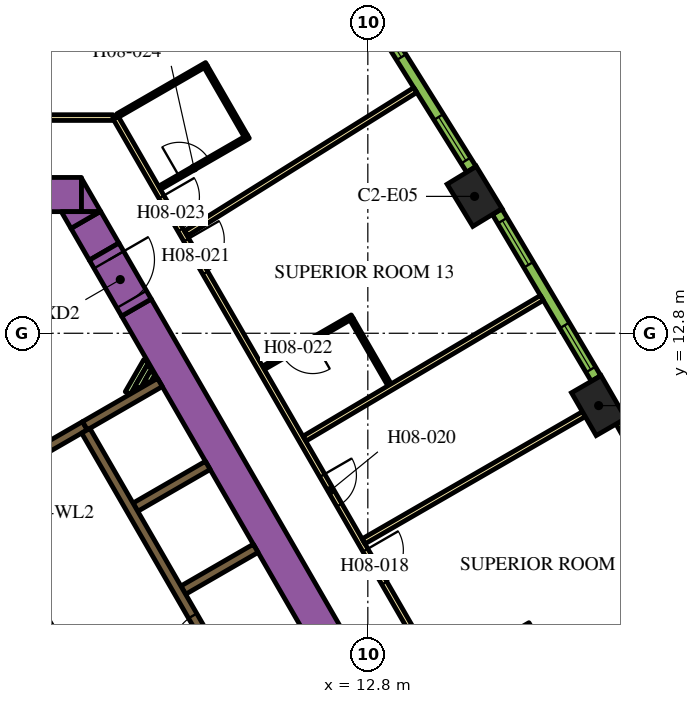
"""IFC4 building model, lengths in metres.
Left out: names, types, materials, properties, quantities, classifications, styles, units other than length and angle.
Written with IfcOpenShell. Run it as: python <this file> out.ifc"""

import sys

from ifc_helpers import new_model, si_unit, direction, frame, frame_2d, origin, origin_2d, place, context, subcontext, project, spatial, polyline, rectangle, outline, extrude, element, fill, save


model = new_model("IFC4")
c1 = context("Model", 3, precision=1e-05, world=origin(), true_north=direction((0.0, 1.0)))
c2 = subcontext(c1, "Body", "Model", "MODEL_VIEW")
j1 = project(units=[si_unit("LENGTHUNIT", "METRE"), si_unit("PLANEANGLEUNIT", "RADIAN")], contexts=[c1])
p1 = place(None, origin())
s1 = spatial("IfcSite", under=j1, at=p1, CompositionType="ELEMENT")
p2 = place(p1, origin())
s2 = spatial("IfcBuilding", under=s1, at=p2, CompositionType="ELEMENT")
p3 = place(p2, frame((0.0, 0.0, 107.1)))
s3 = spatial("IfcBuildingStorey", under=s2, at=p3, CompositionType="ELEMENT", Elevation=107.1)
for number, where, z_axis, x_axis in (
    (1, (18.874, 10.897, 0.0), (0.0, 0.0, 1.0), (-0.5, 0.866, 0.0)),
    (2, (15.609, 16.402, 0.0), (0.0, 0.0, 1.0), (-0.52, 0.854, 0.0)),
):
    element("IfcColumn", number, at=place(p3, frame(where, z_axis=z_axis, x_axis=x_axis)), inside=s3, PredefinedType="COLUMN", context=c2, shape_type="SweptSolid", body=[
        extrude(rectangle(XDim=1.3, YDim=0.9, at=origin_2d()), origin(), (0.0, 0.0, 1.0), 3.9),
    ])
p4 = place(p3, frame((6.711, 13.476, 0.0), z_axis=(0.0, 0.0, 1.0), x_axis=(0.500002723396, -0.866023831425, 0.0)))
e3 = element("IfcWall", 3, at=p4, inside=s3, PredefinedType="SOLIDWALL", context=c2, shape_type="SweptSolid", body=[
    extrude(rectangle(XDim=20.334, YDim=0.9, at=frame_2d((10.167, 0.0))), origin(), (0.0, 0.0, 1.0), 3.9),
])
p5 = place(p3, frame((-4.224, 16.45, 0.0), z_axis=(0.0, 0.0, 1.0), x_axis=(1.0, 0.0, 0.0)))
e4 = element("IfcWall", 4, at=p5, inside=s3, PredefinedType="SOLIDWALL", context=c2, shape_type="SweptSolid", body=[
    extrude(rectangle(XDim=9.488, YDim=0.9, at=frame_2d((4.744, 0.0))), origin(), (0.0, 0.0, 1.0), 3.9),
])
p6 = place(p3, origin())
e5 = element("IfcWall", 5, at=p6, inside=s3, PredefinedType="SOLIDWALL", context=c2, shape_type="SweptSolid", body=[
    extrude(outline(polyline([(5.265, 16.0), (5.265, 16.88), (5.773, 16.0), (5.265, 16.0)])), origin(), (0.0, 0.0, 1.0), 3.9),
])
p7 = place(p3, frame((5.861, 14.949, 0.0), z_axis=(0.0, 0.0, 1.0), x_axis=(-0.50011719232, 0.865957732194, 0.0)))
e6 = element("IfcWall", 6, at=p7, inside=s3, PredefinedType="SOLIDWALL", context=c2, shape_type="SweptSolid", body=[
    extrude(rectangle(XDim=0.964, YDim=0.9, at=frame_2d((0.482, 0.0))), origin(), (0.0, 0.0, 1.0), 3.9),
])
e7 = element("IfcWall", 7, at=p6, inside=s3, PredefinedType="SOLIDWALL", context=c2, shape_type="SweptSolid", body=[
    extrude(outline(polyline([(4.734, 16.0), (5.75, 16.0), (4.988, 15.56), (4.734, 16.0)])), origin(), (0.0, 0.0, 1.0), 3.9),
])
e8 = element("IfcWall", 8, at=p6, inside=s3, PredefinedType="SOLIDWALL", context=c2, shape_type="SweptSolid", body=[
    extrude(outline(polyline([(0.566, 6.725), (0.566, 6.875), (0.566, 6.875), (0.565, 6.875), (0.361, 6.875), (0.035, 7.439), (0.252, 7.564), (0.377, 7.348), (6.552, -3.348), (6.677, -3.564), (6.46, -3.689), (0.448, 6.725), (0.565, 6.725), (0.566, 6.725), (0.566, 6.725)])), origin(), (0.0, 0.0, 1.0), 3.9),
])
p8 = place(p3, frame((4.358, 9.791, 0.0), z_axis=(0.0, 0.0, 1.0), x_axis=(0.866079547155, 0.499906209203, 0.0)))
e9 = element("IfcWall", 9, at=p8, inside=s3, PredefinedType="SOLIDWALL", context=c2, shape_type="SweptSolid", body=[
    extrude(rectangle(XDim=1.15, YDim=0.25, at=frame_2d((0.575, 0.0))), origin(), (0.0, 0.0, 1.0), 3.9),
])
p9 = place(p3, frame((5.356, 10.367, 0.0), z_axis=(0.0, 0.0, 1.0), x_axis=(0.865978535641, 0.50008116922, 0.0)))
e10 = element("IfcWall", 10, at=p9, inside=s3, PredefinedType="SOLIDWALL", context=c2, shape_type="SweptSolid", body=[
    extrude(rectangle(XDim=2.278, YDim=0.25, at=frame_2d((1.139, 0.0))), origin(), (0.0, 0.0, 1.0), 3.9),
])
for number, where, z_axis, x_axis in (
    (11, (6.684, 8.224, 0.0), (0.0, 0.0, 1.0), (0.866, 0.5, 0.0)),
    (12, (7.944, 6.041, 0.0), (0.0, 0.0, 1.0), (0.866, 0.5, 0.0)),
):
    element("IfcWall", number, at=place(p3, frame(where, z_axis=z_axis, x_axis=x_axis)), inside=s3, PredefinedType="SOLIDWALL", context=c2, shape_type="SweptSolid", body=[
        extrude(rectangle(XDim=2.2, YDim=0.25, at=frame_2d((1.1, 0.0))), origin(), (0.0, 0.0, 1.0), 3.9),
    ])
p10 = place(p3, frame((6.482, 11.225, 0.0), z_axis=(0.0, 0.0, 1.0), x_axis=(0.5001061818, 0.865964091014, 0.0)))
e13 = element("IfcWall", 13, at=p10, inside=s3, PredefinedType="PARTITIONING", context=c2, shape_type="SweptSolid", body=[
    extrude(rectangle(XDim=0.973, YDim=0.15, at=frame_2d((0.486, 0.0))), origin(), (0.0, 0.0, 1.0), 2.75),
])
p11 = place(p3, frame((6.742, 11.375, 0.0), z_axis=(0.0, 0.0, 1.0), x_axis=(0.499744951064, 0.86617260629, 0.0)))
e14 = element("IfcWall", 14, at=p11, inside=s3, PredefinedType="PARTITIONING", context=c2, shape_type="SweptSolid", body=[
    extrude(rectangle(XDim=0.626, YDim=0.15, at=frame_2d((0.313, 0.0))), origin(), (0.0, 0.0, 1.0), 2.75),
])
p12 = place(p3, frame((7.001, 11.525, 0.0), z_axis=(0.0, 0.0, 1.0), x_axis=(0.499797962495, 0.866142018774, 0.0)))
e15 = element("IfcWall", 15, at=p12, inside=s3, PredefinedType="PARTITIONING", context=c2, shape_type="SweptSolid", body=[
    extrude(rectangle(XDim=0.28, YDim=0.15, at=frame_2d((0.14, 0.0))), origin(), (0.0, 0.0, 1.0), 2.75),
])
p13 = place(p3, frame((11.553, -0.46, 0.0), z_axis=(0.0, 0.0, 1.0), x_axis=(-0.500006514828, 0.866021642414, 0.0)))
e16 = element("IfcWall", 16, at=p13, inside=s3, PredefinedType="SOLIDWALL", context=c2, shape_type="SweptSolid", body=[
    extrude(rectangle(XDim=12.35, YDim=0.25, at=frame_2d((6.175, 0.0))), origin(), (0.0, 0.0, 1.0), 3.9),
])
p14 = place(p13, frame((0.585, 0.0, 0.0)))
e17 = element("IfcOpeningElement", 17, at=p14, cuts=e16, PredefinedType="OPENING", context=c2, shape_type="SweptSolid", body=[
    extrude(rectangle(XDim=1.1, YDim=2.1, at=frame_2d((0.55, 1.05))), frame((0.0, 0.135, 0.0), z_axis=(0.0, -1.0, 0.0), x_axis=(1.0, 0.0, 0.0)), (0.0, 0.0, 1.0), 0.27),
])
p15 = place(p13, frame((3.105, 0.0, 0.0)))
e18 = element("IfcOpeningElement", 18, at=p15, cuts=e16, PredefinedType="OPENING", context=c2, shape_type="SweptSolid", body=[
    extrude(rectangle(XDim=1.1, YDim=2.1, at=frame_2d((0.55, 1.05))), frame((0.0, 0.135, 0.0), z_axis=(0.0, -1.0, 0.0), x_axis=(1.0, 0.0, 0.0)), (0.0, 0.0, 1.0), 0.27),
])
p16 = place(p13, frame((5.625, 0.0, 0.0)))
e19 = element("IfcOpeningElement", 19, at=p16, cuts=e16, PredefinedType="OPENING", context=c2, shape_type="SweptSolid", body=[
    extrude(rectangle(XDim=1.1, YDim=2.1, at=frame_2d((0.55, 1.05))), frame((0.0, 0.135, 0.0), z_axis=(0.0, -1.0, 0.0), x_axis=(1.0, 0.0, 0.0)), (0.0, 0.0, 1.0), 0.27),
])
p17 = place(p3, frame((8.565, -2.185, 0.0), z_axis=(0.0, 0.0, 1.0), x_axis=(-0.499997954832, 0.866026584559, 0.0)))
e20 = element("IfcWall", 20, at=p17, inside=s3, PredefinedType="SOLIDWALL", context=c2, shape_type="SweptSolid", body=[
    extrude(rectangle(XDim=12.35, YDim=0.25, at=frame_2d((6.175, 0.0))), origin(), (0.0, 0.0, 1.0), 3.9),
])
p18 = place(p17, frame((5.725, 0.0, 0.0)))
e21 = element("IfcOpeningElement", 21, at=p18, cuts=e20, PredefinedType="OPENING", context=c2, shape_type="SweptSolid", body=[
    extrude(rectangle(XDim=0.9, YDim=2.1, at=frame_2d((0.45, 1.05))), frame((0.0, 0.135, 0.0), z_axis=(0.0, -1.0, 0.0), x_axis=(1.0, 0.0, 0.0)), (0.0, 0.0, 1.0), 0.27),
])
p19 = place(p3, frame((5.861, 14.948, 0.0), z_axis=(0.0, 0.0, 1.0), x_axis=(0.500062241894, -0.865989465428, 0.0)))
e22 = element("IfcWall", 22, at=p19, inside=s3, PredefinedType="SOLIDWALL", context=c2, shape_type="SweptSolid", body=[
    extrude(rectangle(XDim=1.7, YDim=0.9, at=frame_2d((0.85, 0.0))), origin(), (0.0, 0.0, 1.0), 3.9),
])
p20 = place(p19, frame((0.25, 0.0, 0.0)))
e23 = element("IfcOpeningElement", 23, at=p20, cuts=e22, PredefinedType="OPENING", context=c2, shape_type="SweptSolid", body=[
    extrude(rectangle(XDim=1.2, YDim=2.1, at=frame_2d((0.6, 1.05))), frame((0.0, 0.46, 0.0), z_axis=(0.0, -1.0, 0.0), x_axis=(1.0, 0.0, 0.0)), (0.0, 0.0, 1.0), 0.92),
])
p21 = place(p3, frame((6.163, 18.475, 0.0), z_axis=(0.0, 0.0, 1.0), x_axis=(0.500001317485, -0.866024643133, 0.0)))
e24 = element("IfcWall", 24, at=p21, inside=s3, PredefinedType="PARTITIONING", context=c2, shape_type="SweptSolid", body=[
    extrude(rectangle(XDim=25.767, YDim=0.15, at=frame_2d((12.883, 0.0))), origin(), (0.0, 0.0, 1.0), 2.75),
])
p22 = place(p21, frame((24.241, 0.0, 0.0)))
e25 = element("IfcOpeningElement", 25, at=p22, cuts=e24, PredefinedType="OPENING", context=c2, shape_type="SweptSolid", body=[
    extrude(rectangle(XDim=1.0, YDim=2.1, at=frame_2d((0.5, 1.05))), frame((0.0, 0.085, 0.0), z_axis=(0.0, -1.0, 0.0), x_axis=(1.0, 0.0, 0.0)), (0.0, 0.0, 1.0), 0.17),
])
p23 = place(p21, frame((13.144, 0.0, 0.0)))
e26 = element("IfcOpeningElement", 26, at=p23, cuts=e24, PredefinedType="OPENING", context=c2, shape_type="SweptSolid", body=[
    extrude(rectangle(XDim=1.0, YDim=2.1, at=frame_2d((0.5, 1.05))), frame((0.0, 0.085, 0.0), z_axis=(0.0, -1.0, 0.0), x_axis=(1.0, 0.0, 0.0)), (0.0, 0.0, 1.0), 0.17),
])
p24 = place(p21, frame((10.874, 0.0, 0.0)))
e27 = element("IfcOpeningElement", 27, at=p24, cuts=e24, PredefinedType="OPENING", context=c2, shape_type="SweptSolid", body=[
    extrude(rectangle(XDim=0.9, YDim=2.1, at=frame_2d((0.45, 1.05))), frame((0.0, 0.085, 0.0), z_axis=(0.0, -1.0, 0.0), x_axis=(1.0, 0.0, 0.0)), (0.0, 0.0, 1.0), 0.17),
])
p25 = place(p21, frame((3.718, 0.0, 0.0)))
e28 = element("IfcOpeningElement", 28, at=p25, cuts=e24, PredefinedType="OPENING", context=c2, shape_type="SweptSolid", body=[
    extrude(rectangle(XDim=1.0, YDim=2.1, at=frame_2d((0.5, 1.05))), frame((0.0, 0.085, 0.0), z_axis=(0.0, -1.0, 0.0), x_axis=(1.0, 0.0, 0.0)), (0.0, 0.0, 1.0), 0.17),
])
p26 = place(p21, frame((2.411, 0.0, 0.0)))
e29 = element("IfcOpeningElement", 29, at=p26, cuts=e24, PredefinedType="OPENING", context=c2, shape_type="SweptSolid", body=[
    extrude(rectangle(XDim=1.0, YDim=2.1, at=frame_2d((0.5, 1.05))), frame((0.0, 0.085, 0.0), z_axis=(0.0, -1.0, 0.0), x_axis=(1.0, 0.0, 0.0)), (0.0, 0.0, 1.0), 0.17),
])
p27 = place(p3, frame((0.825, 18.475, 0.0), z_axis=(0.0, 0.0, 1.0), x_axis=(1.0, 0.0, 0.0)))
e30 = element("IfcWall", 30, at=p27, inside=s3, PredefinedType="PARTITIONING", context=c2, shape_type="SweptSolid", body=[
    extrude(rectangle(XDim=5.268, YDim=0.15, at=frame_2d((2.634, 0.0))), origin(), (0.0, 0.0, 1.0), 2.75),
])
p28 = place(p3, frame((10.592, 24.589, 0.0), z_axis=(0.0, 0.0, 1.0), x_axis=(-0.835337323748, -0.549737715236, 0.0)))
e31 = element("IfcWall", 31, at=p28, inside=s3, PredefinedType="PARTITIONING", context=c2, shape_type="SweptSolid", body=[
    extrude(rectangle(XDim=10.875, YDim=0.15, at=frame_2d((5.438, 0.0))), origin(), (0.0, 0.0, 1.0), 2.75),
])
p29 = place(p3, frame((14.049, 19.2, 0.0), z_axis=(0.0, 0.0, 1.0), x_axis=(-0.847955867271, -0.530066832731, 0.0)))
e32 = element("IfcWall", 32, at=p29, inside=s3, PredefinedType="PARTITIONING", context=c2, shape_type="SweptSolid", body=[
    extrude(rectangle(XDim=7.111, YDim=0.15, at=frame_2d((3.556, 0.0))), origin(), (0.0, 0.0, 1.0), 2.75),
])
p30 = place(p3, frame((17.379, 13.731, 0.0), z_axis=(0.0, 0.0, 1.0), x_axis=(-0.860132461691, -0.510070728768, 0.0)))
e33 = element("IfcWall", 33, at=p30, inside=s3, PredefinedType="PARTITIONING", context=c2, shape_type="SweptSolid", body=[
    extrude(rectangle(XDim=7.257, YDim=0.15, at=frame_2d((3.628, 0.0))), origin(), (0.0, 0.0, 1.0), 2.75),
])
p31 = place(p3, frame((18.484, 10.672, 0.0), z_axis=(0.0, 0.0, 1.0), x_axis=(-0.866019162053, -0.50001081084, 0.0)))
e34 = element("IfcWall", 34, at=p31, inside=s3, PredefinedType="PARTITIONING", context=c2, shape_type="SweptSolid", body=[
    extrude(rectangle(XDim=6.694, YDim=0.15, at=frame_2d((3.347, 0.0))), origin(), (0.0, 0.0, 1.0), 2.75),
])
p32 = place(p3, frame((21.614, 5.102, 0.0), z_axis=(0.0, 0.0, 1.0), x_axis=(-0.877484555087, -0.479604895287, 0.0)))
e35 = element("IfcWall", 35, at=p32, inside=s3, PredefinedType="PARTITIONING", context=c2, shape_type="SweptSolid", body=[
    extrude(rectangle(XDim=6.611, YDim=0.15, at=frame_2d((3.306, 0.0))), origin(), (0.0, 0.0, 1.0), 2.75),
])
p33 = place(p3, frame((17.066, 5.141, 0.0), z_axis=(0.0, 0.0, 1.0), x_axis=(-0.866059108428, -0.4999416173, 0.0)))
e36 = element("IfcWall", 36, at=p33, inside=s3, PredefinedType="PARTITIONING", context=c2, shape_type="SweptSolid", body=[
    extrude(rectangle(XDim=2.7, YDim=0.1, at=frame_2d((1.35, 0.0))), origin(), (0.0, 0.0, 1.0), 2.75),
])
p34 = place(p33, frame((1.2, 0.0, 0.0)))
e37 = element("IfcOpeningElement", 37, at=p34, cuts=e36, PredefinedType="OPENING", context=c2, shape_type="SweptSolid", body=[
    extrude(rectangle(XDim=0.9, YDim=2.1, at=frame_2d((0.45, 1.05))), frame((0.0, 0.06, 0.0), z_axis=(0.0, -1.0, 0.0), x_axis=(1.0, 0.0, 0.0)), (0.0, 0.0, 1.0), 0.12),
])
p35 = place(p3, frame((12.39, 13.239, 0.0), z_axis=(0.0, 0.0, 1.0), x_axis=(-0.866036505625, -0.499980770555, 0.0)))
e38 = element("IfcWall", 38, at=p35, inside=s3, PredefinedType="PARTITIONING", context=c2, shape_type="SweptSolid", body=[
    extrude(rectangle(XDim=2.7, YDim=0.1, at=frame_2d((1.35, 0.0))), origin(), (0.0, 0.0, 1.0), 2.75),
])
p36 = place(p35, frame((1.2, 0.0, 0.0)))
e39 = element("IfcOpeningElement", 39, at=p36, cuts=e38, PredefinedType="OPENING", context=c2, shape_type="SweptSolid", body=[
    extrude(rectangle(XDim=0.9, YDim=2.1, at=frame_2d((0.45, 1.05))), frame((0.0, 0.06, 0.0), z_axis=(0.0, -1.0, 0.0), x_axis=(1.0, 0.0, 0.0)), (0.0, 0.0, 1.0), 0.12),
])
p37 = place(p3, frame((12.372, 13.171, 0.0), z_axis=(0.0, 0.0, 1.0), x_axis=(0.500044573643, -0.86599966765, 0.0)))
e40 = element("IfcWall", 40, at=p37, inside=s3, PredefinedType="PARTITIONING", context=c2, shape_type="SweptSolid", body=[
    extrude(rectangle(XDim=1.99, YDim=0.1, at=frame_2d((0.995, 0.0))), origin(), (0.0, 0.0, 1.0), 2.75),
])
p38 = place(p3, frame((7.318, 16.625, 0.0), z_axis=(0.0, 0.0, 1.0), x_axis=(0.866019956843, 0.50000943426, 0.0)))
e41 = element("IfcWall", 41, at=p38, inside=s3, PredefinedType="PARTITIONING", context=c2, shape_type="SweptSolid", body=[
    extrude(rectangle(XDim=2.7, YDim=0.1, at=frame_2d((1.35, 0.0))), origin(), (0.0, 0.0, 1.0), 2.75),
])
p39 = place(p38, frame((0.6, 0.0, 0.0)))
e42 = element("IfcOpeningElement", 42, at=p39, cuts=e41, PredefinedType="OPENING", context=c2, shape_type="SweptSolid", body=[
    extrude(rectangle(XDim=0.9, YDim=2.1, at=frame_2d((0.45, 1.05))), frame((0.0, 0.06, 0.0), z_axis=(0.0, -1.0, 0.0), x_axis=(1.0, 0.0, 0.0)), (0.0, 0.0, 1.0), 0.12),
])
p40 = place(p3, frame((9.588, 17.993, 0.0), z_axis=(0.0, 0.0, 1.0), x_axis=(-0.500027713859, 0.866009402589, 0.0)))
e43 = element("IfcWall", 43, at=p40, inside=s3, PredefinedType="PARTITIONING", context=c2, shape_type="SweptSolid", body=[
    extrude(rectangle(XDim=2.1, YDim=0.1, at=frame_2d((1.05, 0.0))), origin(), (0.0, 0.0, 1.0), 2.75),
])
p41 = place(p3, frame((6.218, 18.53, 0.0), z_axis=(0.0, 0.0, 1.0), x_axis=(0.86599734893, 0.500048589285, 0.0)))
e44 = element("IfcWall", 44, at=p41, inside=s3, PredefinedType="PARTITIONING", context=c2, shape_type="SweptSolid", body=[
    extrude(rectangle(XDim=2.7, YDim=0.1, at=frame_2d((1.35, 0.0))), origin(), (0.0, 0.0, 1.0), 2.75),
])
p42 = place(p3, frame((21.956, 6.033, 0.0), z_axis=(0.0, 0.0, 1.0), x_axis=(-0.48983164787, 0.87181704316, 0.0)))
e45 = element("IfcWall", 45, at=p42, inside=s3, PredefinedType="SOLIDWALL", context=c2, shape_type="SweptSolid", body=[
    extrude(rectangle(XDim=5.1, YDim=0.29, at=frame_2d((2.55, 0.0))), origin(), (0.0, 0.0, 1.0), 3.65),
])
p43 = place(p42, frame((0.273, 0.0, 0.9)))
e46 = element("IfcOpeningElement", 46, at=p43, cuts=e45, PredefinedType="OPENING", context=c2, shape_type="SweptSolid", body=[
    extrude(rectangle(XDim=1.35, YDim=2.15, at=frame_2d((0.675, 1.075))), frame((0.0, 0.155, 0.0), z_axis=(0.0, -1.0, 0.0), x_axis=(1.0, 0.0, 0.0)), (0.0, 0.0, 1.0), 0.31),
])
p44 = place(p42, frame((3.478, 0.0, 0.9)))
e47 = element("IfcOpeningElement", 47, at=p44, cuts=e45, PredefinedType="OPENING", context=c2, shape_type="SweptSolid", body=[
    extrude(rectangle(XDim=1.35, YDim=2.15, at=frame_2d((0.675, 1.075))), frame((0.0, 0.155, 0.0), z_axis=(0.0, -1.0, 0.0), x_axis=(1.0, 0.0, 0.0)), (0.0, 0.0, 1.0), 0.31),
])
p45 = place(p3, frame((18.805, 11.611, 0.0), z_axis=(0.0, 0.0, 1.0), x_axis=(-0.510054281659, 0.860142214847, 0.0)))
e48 = element("IfcWall", 48, at=p45, inside=s3, PredefinedType="SOLIDWALL", context=c2, shape_type="SweptSolid", body=[
    extrude(rectangle(XDim=5.101, YDim=0.29, at=frame_2d((2.55, 0.0))), origin(), (0.0, 0.0, 1.0), 3.65),
])
p46 = place(p45, frame((0.273, 0.0, 0.9)))
e49 = element("IfcOpeningElement", 49, at=p46, cuts=e48, PredefinedType="OPENING", context=c2, shape_type="SweptSolid", body=[
    extrude(rectangle(XDim=1.35, YDim=2.15, at=frame_2d((0.675, 1.075))), frame((0.0, 0.155, 0.0), z_axis=(0.0, -1.0, 0.0), x_axis=(1.0, 0.0, 0.0)), (0.0, 0.0, 1.0), 0.31),
])
p47 = place(p45, frame((3.478, 0.0, 0.9)))
e50 = element("IfcOpeningElement", 50, at=p47, cuts=e48, PredefinedType="OPENING", context=c2, shape_type="SweptSolid", body=[
    extrude(rectangle(XDim=1.35, YDim=2.15, at=frame_2d((0.675, 1.075))), frame((0.0, 0.155, 0.0), z_axis=(0.0, -1.0, 0.0), x_axis=(1.0, 0.0, 0.0)), (0.0, 0.0, 1.0), 0.31),
])
p48 = place(p3, frame((15.524, 17.114, 0.0), z_axis=(0.0, 0.0, 1.0), x_axis=(-0.530072082134, 0.847952585787, 0.0)))
e51 = element("IfcWall", 51, at=p48, inside=s3, PredefinedType="SOLIDWALL", context=c2, shape_type="SweptSolid", body=[
    extrude(rectangle(XDim=5.1, YDim=0.29, at=frame_2d((2.55, 0.0))), origin(), (0.0, 0.0, 1.0), 3.65),
])
p49 = place(p48, frame((0.273, 0.0, 0.9)))
e52 = element("IfcOpeningElement", 52, at=p49, cuts=e51, PredefinedType="OPENING", context=c2, shape_type="SweptSolid", body=[
    extrude(rectangle(XDim=1.35, YDim=2.15, at=frame_2d((0.675, 1.075))), frame((0.0, 0.155, 0.0), z_axis=(0.0, -1.0, 0.0), x_axis=(1.0, 0.0, 0.0)), (0.0, 0.0, 1.0), 0.31),
])
p50 = place(p48, frame((3.478, 0.0, 0.9)))
e53 = element("IfcOpeningElement", 53, at=p50, cuts=e51, PredefinedType="OPENING", context=c2, shape_type="SweptSolid", body=[
    extrude(rectangle(XDim=1.35, YDim=2.15, at=frame_2d((0.675, 1.075))), frame((0.0, 0.155, 0.0), z_axis=(0.0, -1.0, 0.0), x_axis=(1.0, 0.0, 0.0)), (0.0, 0.0, 1.0), 0.31),
])
p51 = place(p16, origin())
e54 = element("IfcDoor", 54, at=p51, inside=s3, OperationType="DOUBLE_DOOR_SLIDING", PredefinedType="DOOR", context=c2, shape_type="SweptSolid", body=[
    extrude(rectangle(XDim=1.1, YDim=2.1, at=frame_2d((0.55, 1.05))), frame((0.0, 0.025, 0.0), z_axis=(0.0, -1.0, 0.0), x_axis=(1.0, 0.0, 0.0)), (0.0, 0.0, 1.0), 0.05),
])
fill(e19, e54)
p52 = place(p20, origin())
e55 = element("IfcDoor", 55, at=p52, inside=s3, OperationType="SINGLE_SWING_LEFT", PredefinedType="DOOR", context=c2, shape_type="SweptSolid", body=[
    extrude(rectangle(XDim=1.2, YDim=2.1, at=frame_2d((0.6, 1.05))), frame((0.0, 0.025, 0.0), z_axis=(0.0, -1.0, 0.0), x_axis=(1.0, 0.0, 0.0)), (0.0, 0.0, 1.0), 0.05),
])
fill(e23, e55)
p53 = place(p23, origin())
e56 = element("IfcDoor", 56, at=p53, inside=s3, OperationType="SINGLE_SWING_LEFT", PredefinedType="DOOR", context=c2, shape_type="SweptSolid", body=[
    extrude(rectangle(XDim=1.0, YDim=2.1, at=frame_2d((0.5, 1.05))), frame((0.0, 0.025, 0.0), z_axis=(0.0, -1.0, 0.0), x_axis=(1.0, 0.0, 0.0)), (0.0, 0.0, 1.0), 0.05),
])
fill(e26, e56)
p54 = place(p24, origin())
e57 = element("IfcDoor", 57, at=p54, inside=s3, OperationType="SINGLE_SWING_RIGHT", PredefinedType="DOOR", context=c2, shape_type="SweptSolid", body=[
    extrude(rectangle(XDim=0.9, YDim=2.1, at=frame_2d((0.45, 1.05))), frame((0.0, 0.025, 0.0), z_axis=(0.0, -1.0, 0.0), x_axis=(1.0, 0.0, 0.0)), (0.0, 0.0, 1.0), 0.05),
])
fill(e27, e57)
p55 = place(p25, origin())
e58 = element("IfcDoor", 58, at=p55, inside=s3, OperationType="SINGLE_SWING_LEFT", PredefinedType="DOOR", context=c2, shape_type="SweptSolid", body=[
    extrude(rectangle(XDim=1.0, YDim=2.1, at=frame_2d((0.5, 1.05))), frame((0.0, 0.025, 0.0), z_axis=(0.0, -1.0, 0.0), x_axis=(1.0, 0.0, 0.0)), (0.0, 0.0, 1.0), 0.05),
])
fill(e28, e58)
p56 = place(p36, origin())
e59 = element("IfcDoor", 59, at=p56, inside=s3, OperationType="SINGLE_SWING_LEFT", PredefinedType="DOOR", context=c2, shape_type="SweptSolid", body=[
    extrude(rectangle(XDim=0.9, YDim=2.1, at=frame_2d((0.45, 1.05))), frame((0.0, 0.025, 0.0), z_axis=(0.0, -1.0, 0.0), x_axis=(1.0, 0.0, 0.0)), (0.0, 0.0, 1.0), 0.05),
])
fill(e39, e59)
p57 = place(p26, origin())
e60 = element("IfcDoor", 60, at=p57, inside=s3, OperationType="SINGLE_SWING_RIGHT", PredefinedType="DOOR", context=c2, shape_type="SweptSolid", body=[
    extrude(rectangle(XDim=1.0, YDim=2.1, at=frame_2d((0.5, 1.05))), frame((0.0, 0.025, 0.0), z_axis=(0.0, -1.0, 0.0), x_axis=(1.0, 0.0, 0.0)), (0.0, 0.0, 1.0), 0.05),
])
fill(e29, e60)
p58 = place(p39, origin())
e61 = element("IfcDoor", 61, at=p58, inside=s3, OperationType="SINGLE_SWING_LEFT", PredefinedType="DOOR", context=c2, shape_type="SweptSolid", body=[
    extrude(rectangle(XDim=0.9, YDim=2.1, at=frame_2d((0.45, 1.05))), frame((0.0, 0.025, 0.0), z_axis=(0.0, -1.0, 0.0), x_axis=(1.0, 0.0, 0.0)), (0.0, 0.0, 1.0), 0.05),
])
fill(e42, e61)
p59 = place(p46, origin())
e62 = element("IfcWindow", 62, at=p59, inside=s3, PartitioningType="DOUBLE_PANEL_VERTICAL", PredefinedType="WINDOW", context=c2, shape_type="SweptSolid", body=[
    extrude(rectangle(XDim=1.35, YDim=2.15, at=frame_2d((0.675, 1.075))), frame((0.0, 0.015, 0.0), z_axis=(0.0, -1.0, 0.0), x_axis=(1.0, 0.0, 0.0)), (0.0, 0.0, 1.0), 0.06),
])
fill(e49, e62)
p60 = place(p47, origin())
e63 = element("IfcWindow", 63, at=p60, inside=s3, PartitioningType="DOUBLE_PANEL_VERTICAL", PredefinedType="WINDOW", context=c2, shape_type="SweptSolid", body=[
    extrude(rectangle(XDim=1.35, YDim=2.15, at=frame_2d((0.675, 1.075))), frame((0.0, 0.015, 0.0), z_axis=(0.0, -1.0, 0.0), x_axis=(1.0, 0.0, 0.0)), (0.0, 0.0, 1.0), 0.06),
])
fill(e50, e63)
p61 = place(p49, origin())
e64 = element("IfcWindow", 64, at=p61, inside=s3, PartitioningType="DOUBLE_PANEL_VERTICAL", PredefinedType="WINDOW", context=c2, shape_type="SweptSolid", body=[
    extrude(rectangle(XDim=1.35, YDim=2.15, at=frame_2d((0.675, 1.075))), frame((0.0, 0.015, 0.0), z_axis=(0.0, -1.0, 0.0), x_axis=(1.0, 0.0, 0.0)), (0.0, 0.0, 1.0), 0.06),
])
fill(e52, e64)
p62 = place(p50, origin())
e65 = element("IfcWindow", 65, at=p62, inside=s3, PartitioningType="DOUBLE_PANEL_VERTICAL", PredefinedType="WINDOW", context=c2, shape_type="SweptSolid", body=[
    extrude(rectangle(XDim=1.35, YDim=2.15, at=frame_2d((0.675, 1.075))), frame((0.0, 0.015, 0.0), z_axis=(0.0, -1.0, 0.0), x_axis=(1.0, 0.0, 0.0)), (0.0, 0.0, 1.0), 0.06),
])
fill(e53, e65)
save(model, sys.argv[1])
